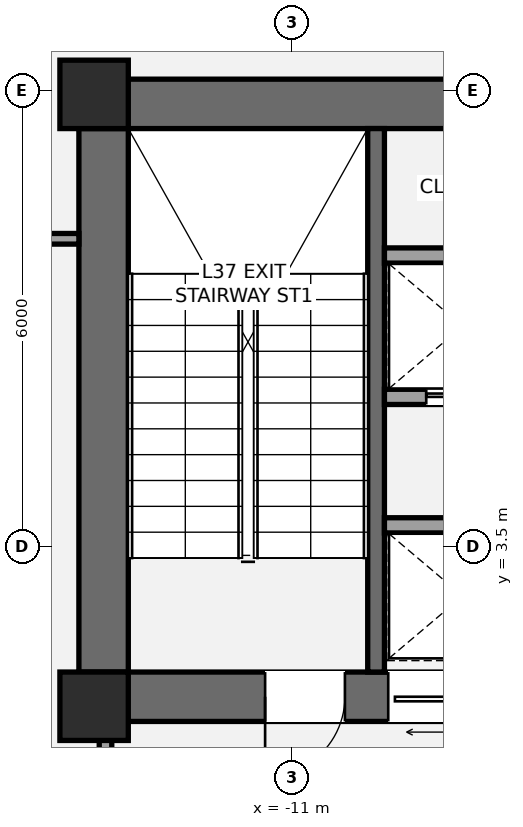
"""IFC4 building model, lengths in metres.
Left out: names, types, materials, properties, quantities, classifications, styles, units other than length and angle.
Written with IfcOpenShell. Run it as: python <this file> out.ifc"""

import sys

from ifc_helpers import new_model, si_unit, direction, frame, frame_2d, origin, origin_2d, place, context, subcontext, project, spatial, rectangle, extrude, element, fill, save


model = new_model("IFC4")
c1 = context("Model", 3, precision=1e-05, world=origin(), true_north=direction((0.0, 1.0)))
c2 = subcontext(c1, "Body", "Model", "MODEL_VIEW")
j1 = project(units=[si_unit("LENGTHUNIT", "METRE"), si_unit("PLANEANGLEUNIT", "RADIAN")], contexts=[c1])
p1 = place(None, origin())
s1 = spatial("IfcSite", under=j1, at=p1, CompositionType="ELEMENT")
p2 = place(p1, origin())
s2 = spatial("IfcBuilding", under=s1, at=p2, CompositionType="ELEMENT")
p3 = place(p2, frame((0.0, 0.0, 139.6)))
s3 = spatial("IfcBuildingStorey", under=s2, at=p3, CompositionType="ELEMENT", Elevation=139.6)
p4 = place(p3, frame((-13.475, 1.2, 0.0), z_axis=(0.0, 0.0, 1.0), x_axis=(0.0, 1.0, 0.0)))
e1 = element("IfcWall", 1, at=p4, inside=s3, PredefinedType="SHEAR", context=c2, shape_type="SweptSolid", body=[
    extrude(rectangle(XDim=8.45, YDim=0.65, at=frame_2d((4.225, 0.0))), origin(), (0.0, 0.0, 1.0), 4.2),
])
p5 = place(p3, frame((-13.8, 9.325, 0.0), z_axis=(0.0, 0.0, 1.0), x_axis=(1.0, 0.0, 0.0)))
e2 = element("IfcWall", 2, at=p5, inside=s3, PredefinedType="SHEAR", context=c2, shape_type="SweptSolid", body=[
    extrude(rectangle(XDim=9.325, YDim=0.65, at=frame_2d((4.663, 0.0))), origin(), (0.0, 0.0, 1.0), 4.2),
])
p6 = place(p3, frame((-4.875, 1.525, 0.0), z_axis=(0.0, 0.0, 1.0), x_axis=(-1.0, 0.0, 0.0)))
e3 = element("IfcWall", 3, at=p6, inside=s3, PredefinedType="SHEAR", context=c2, shape_type="SweptSolid", body=[
    extrude(rectangle(XDim=8.925, YDim=0.65, at=frame_2d((4.462, 0.0))), origin(), (0.0, 0.0, 1.0), 4.2),
])
p7 = place(p6, frame((5.425, 0.0, 0.0)))
e4 = element("IfcOpeningElement", 4, at=p7, cuts=e3, PredefinedType="OPENING", context=c2, shape_type="SweptSolid", body=[
    extrude(rectangle(XDim=1.05, YDim=2.15, at=frame_2d((0.525, 1.075))), frame((0.0, 0.335, 0.0), z_axis=(0.0, -1.0, 0.0), x_axis=(1.0, 0.0, 0.0)), (0.0, 0.0, 1.0), 0.67),
])
p8 = place(p6, frame((3.755, 0.0, 0.0)))
e5 = element("IfcOpeningElement", 5, at=p8, cuts=e3, PredefinedType="OPENING", context=c2, shape_type="SweptSolid", body=[
    extrude(rectangle(XDim=1.1, YDim=2.2, at=frame_2d((0.55, 1.1))), frame((0.0, 0.335, 0.0), z_axis=(0.0, -1.0, 0.0), x_axis=(1.0, 0.0, 0.0)), (0.0, 0.0, 1.0), 0.67),
])
p9 = place(p3, frame((-9.89, 1.85, 0.0), z_axis=(0.0, 0.0, 1.0), x_axis=(0.0, 1.0, 0.0)))
e6 = element("IfcWall", 6, at=p9, inside=s3, PredefinedType="SHEAR", context=c2, shape_type="SweptSolid", body=[
    extrude(rectangle(XDim=7.15, YDim=0.22, at=frame_2d((3.575, 0.0))), origin(), (0.0, 0.0, 1.0), 4.2),
])
for number, where, z_axis, x_axis in (
    (7, (-13.6, 1.4, 0.0), (0.0, 0.0, 1.0), (1.0, 0.0, 0.0)),
    (8, (-13.6, 9.45, 0.0), (0.0, 0.0, 1.0), (1.0, 0.0, 0.0)),
):
    element("IfcColumn", number, at=place(p3, frame(where, z_axis=z_axis, x_axis=x_axis)), inside=s3, PredefinedType="COLUMN", context=c2, shape_type="SweptSolid", body=[
        extrude(rectangle(XDim=0.9, YDim=0.9, at=origin_2d()), origin(), (0.0, 0.0, 1.0), 4.2),
    ])
p10 = place(p3, frame((-13.45, -2.15, 0.0), z_axis=(0.0, 0.0, 1.0), x_axis=(0.0, 1.0, 0.0)))
e9 = element("IfcWall", 9, at=p10, inside=s3, PredefinedType="PARTITIONING", context=c2, shape_type="SweptSolid", body=[
    extrude(rectangle(XDim=3.4, YDim=0.165, at=frame_2d((1.7, 0.0))), origin(), (0.0, 0.0, 1.0), 3.473),
])
p11 = place(p10, frame((1.15, 0.0, 0.0)))
e10 = element("IfcOpeningElement", 10, at=p11, cuts=e9, PredefinedType="OPENING", context=c2, shape_type="SweptSolid", body=[
    extrude(rectangle(XDim=1.05, YDim=2.15, at=frame_2d((0.525, 1.075))), frame((0.0, 0.093, 0.0), z_axis=(0.0, -1.0, 0.0), x_axis=(1.0, 0.0, 0.0)), (0.0, 0.0, 1.0), 0.185),
])
p12 = place(p3, frame((-9.78, 3.78, 0.0), z_axis=(0.0, 0.0, 1.0), x_axis=(1.0, 0.0, 0.0)))
e11 = element("IfcWall", 11, at=p12, inside=s3, PredefinedType="SOLIDWALL", context=c2, shape_type="SweptSolid", body=[
    extrude(rectangle(XDim=4.255, YDim=0.2, at=frame_2d((2.127, 0.0))), origin(), (0.0, 0.0, 1.0), 4.02),
])
p13 = place(p12, frame((2.72, 0.0, 0.0)))
e12 = element("IfcOpeningElement", 12, at=p13, cuts=e11, PredefinedType="OPENING", context=c2, shape_type="SweptSolid", body=[
    extrude(rectangle(XDim=1.1, YDim=2.2, at=frame_2d((0.55, 1.1))), frame((0.0, 0.11, 0.0), z_axis=(0.0, -1.0, 0.0), x_axis=(1.0, 0.0, 0.0)), (0.0, 0.0, 1.0), 0.22),
])
p14 = place(p3, frame((-9.78, 5.47, 0.0), z_axis=(0.0, 0.0, 1.0), x_axis=(1.0, 0.0, 0.0)))
e13 = element("IfcWall", 13, at=p14, inside=s3, PredefinedType="SOLIDWALL", context=c2, shape_type="SweptSolid", body=[
    extrude(rectangle(XDim=4.255, YDim=0.2, at=frame_2d((2.127, 0.0))), origin(), (0.0, 0.0, 1.0), 4.02),
])
p15 = place(p14, frame((0.55, 0.0, 0.0)))
e14 = element("IfcOpeningElement", 14, at=p15, cuts=e13, PredefinedType="OPENING", context=c2, shape_type="SweptSolid", body=[
    extrude(rectangle(XDim=1.1, YDim=2.2, at=frame_2d((0.55, 1.1))), frame((0.0, 0.11, 0.0), z_axis=(0.0, -1.0, 0.0), x_axis=(1.0, 0.0, 0.0)), (0.0, 0.0, 1.0), 0.22),
])
p16 = place(p14, frame((2.72, 0.0, 0.0)))
e15 = element("IfcOpeningElement", 15, at=p16, cuts=e13, PredefinedType="OPENING", context=c2, shape_type="SweptSolid", body=[
    extrude(rectangle(XDim=1.1, YDim=2.2, at=frame_2d((0.55, 1.1))), frame((0.0, 0.11, 0.0), z_axis=(0.0, -1.0, 0.0), x_axis=(1.0, 0.0, 0.0)), (0.0, 0.0, 1.0), 0.22),
])
p17 = place(p3, frame((-9.78, 7.33, 0.0), z_axis=(0.0, 0.0, 1.0), x_axis=(1.0, 0.0, 0.0)))
e16 = element("IfcWall", 16, at=p17, inside=s3, PredefinedType="SOLIDWALL", context=c2, shape_type="SweptSolid", body=[
    extrude(rectangle(XDim=4.255, YDim=0.2, at=frame_2d((2.127, 0.0))), origin(), (0.0, 0.0, 1.0), 4.02),
])
p18 = place(p3, frame((-16.6, 7.55, 0.0), z_axis=(0.0, 0.0, 1.0), x_axis=(1.0, 0.0, 0.0)))
e17 = element("IfcWall", 17, at=p18, inside=s3, PredefinedType="PARTITIONING", context=c2, shape_type="SweptSolid", body=[
    extrude(rectangle(XDim=2.8, YDim=0.14, at=frame_2d((1.4, 0.0))), origin(), (0.0, 0.0, 1.0), 3.473),
])
p19 = place(p18, frame((0.32, 0.0, 0.0)))
e18 = element("IfcOpeningElement", 18, at=p19, cuts=e17, PredefinedType="OPENING", context=c2, shape_type="SweptSolid", body=[
    extrude(rectangle(XDim=0.92, YDim=2.15, at=frame_2d((0.46, 1.075))), frame((0.0, 0.08, 0.0), z_axis=(0.0, -1.0, 0.0), x_axis=(1.0, 0.0, 0.0)), (0.0, 0.0, 1.0), 0.16),
])
p20 = place(p7, origin())
e19 = element("IfcDoor", 19, at=p20, inside=s3, OperationType="SINGLE_SWING_RIGHT", PredefinedType="DOOR", context=c2, shape_type="SweptSolid", body=[
    extrude(rectangle(XDim=1.05, YDim=2.15, at=frame_2d((0.525, 1.075))), frame((0.0, 0.025, 0.0), z_axis=(0.0, -1.0, 0.0), x_axis=(1.0, 0.0, 0.0)), (0.0, 0.0, 1.0), 0.05),
])
fill(e4, e19)
p21 = place(p8, origin())
e20 = element("IfcDoor", 20, at=p21, inside=s3, OperationType="SLIDING_TO_LEFT", PredefinedType="DOOR", context=c2, shape_type="SweptSolid", body=[
    extrude(rectangle(XDim=1.1, YDim=2.2, at=frame_2d((0.55, 1.1))), frame((0.0, 0.025, 0.0), z_axis=(0.0, -1.0, 0.0), x_axis=(1.0, 0.0, 0.0)), (0.0, 0.0, 1.0), 0.05),
])
fill(e5, e20)
p22 = place(p15, origin())
e21 = element("IfcDoor", 21, at=p22, inside=s3, OperationType="SLIDING_TO_LEFT", PredefinedType="DOOR", context=c2, shape_type="SweptSolid", body=[
    extrude(rectangle(XDim=1.1, YDim=2.2, at=frame_2d((0.55, 1.1))), frame((0.0, 0.025, 0.0), z_axis=(0.0, -1.0, 0.0), x_axis=(1.0, 0.0, 0.0)), (0.0, 0.0, 1.0), 0.05),
])
fill(e14, e21)
save(model, sys.argv[1])
